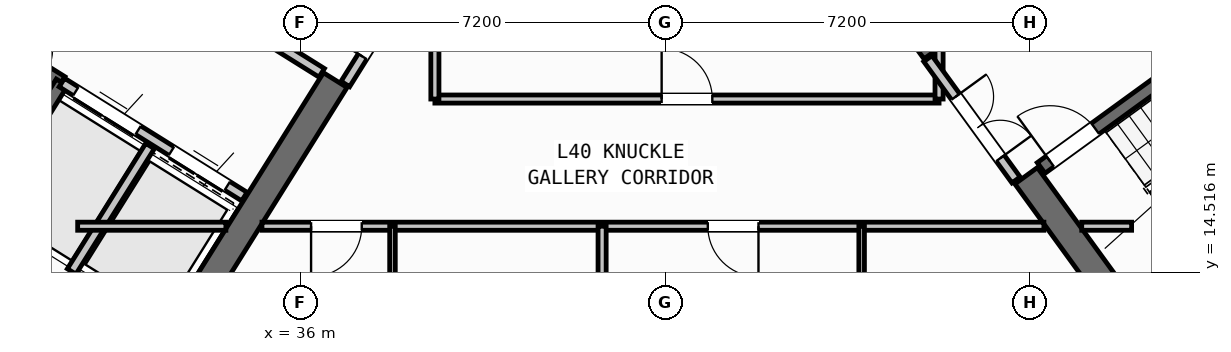
"""IFC4 building model, lengths in metres.
Left out: names, types, materials, properties, quantities, classifications, styles, units other than length and angle.
Written with IfcOpenShell. Run it as: python <this file> out.ifc"""

import sys

from ifc_helpers import new_model, si_unit, direction, frame, frame_2d, origin, place, context, subcontext, project, spatial, rectangle, extrude, source, transform, mapped, element, fill, save


model = new_model("IFC4")
c1 = context("Model", 3, precision=1e-05, world=origin(), true_north=direction((0.0, 1.0)))
c2 = subcontext(c1, "Body", "Model", "MODEL_VIEW")
j1 = project(units=[si_unit("LENGTHUNIT", "METRE"), si_unit("PLANEANGLEUNIT", "RADIAN")], contexts=[c1])
p1 = place(None, origin())
s1 = spatial("IfcSite", under=j1, at=p1, CompositionType="ELEMENT")
p2 = place(p1, origin())
s2 = spatial("IfcBuilding", under=s1, at=p2, CompositionType="ELEMENT")
p3 = place(p2, frame((0.0, 0.0, 158.7)))
s3 = spatial("IfcBuildingStorey", under=s2, at=p3, CompositionType="ELEMENT", Elevation=158.7)
p4 = place(p3, frame((33.366, 12.477, 0.0), z_axis=(0.0, 0.0, 1.0), x_axis=(-0.848047359947, 0.529920442413, 0.0)))
e1 = element("IfcWall", 1, at=p4, inside=s3, PredefinedType="SHEAR", context=c2, shape_type="SweptSolid", body=[
    extrude(rectangle(XDim=13.14, YDim=0.55, at=frame_2d((6.57, 0.0))), origin(), (0.0, 0.0, 1.0), 3.35),
])
p5 = place(p3, frame((36.683, 18.304, 0.0), z_axis=(0.0, 0.0, 1.0), x_axis=(-0.529896466841, -0.848062341122, 0.0)))
e2 = element("IfcWall", 2, at=p5, inside=s3, PredefinedType="SHEAR", context=c2, shape_type="SweptSolid", body=[
    extrude(rectangle(XDim=6.425, YDim=0.55, at=frame_2d((3.212, 0.0))), origin(), (0.0, 0.0, 1.0), 3.35),
])
p6 = place(p3, frame((52.359, 13.14, 0.0), z_axis=(0.0, 0.0, 1.0), x_axis=(0.809014896919, 0.587788139183, 0.0)))
e3 = element("IfcWall", 3, at=p6, inside=s3, PredefinedType="SHEAR", context=c2, shape_type="SweptSolid", body=[
    extrude(rectangle(XDim=12.34, YDim=0.55, at=frame_2d((6.17, 0.0))), origin(), (0.0, 0.0, 1.0), 3.35),
])
p7 = place(p3, frame((52.42, 13.524, 0.0), z_axis=(0.0, 0.0, 1.0), x_axis=(-0.587802113096, 0.809004744015, 0.0)))
e4 = element("IfcWall", 4, at=p7, inside=s3, PredefinedType="SHEAR", context=c2, shape_type="SweptSolid", body=[
    extrude(rectangle(XDim=3.575, YDim=0.55, at=frame_2d((1.788, 0.0))), origin(), (0.0, 0.0, 1.0), 3.35),
])
p8 = place(p3, frame((48.526, 18.884, 0.0), z_axis=(0.0, 0.0, 1.0), x_axis=(-0.587764933797, 0.809031756236, 0.0)))
e5 = element("IfcWall", 5, at=p8, inside=s3, PredefinedType="SHEAR", context=c2, shape_type="SweptSolid", body=[
    extrude(rectangle(XDim=6.425, YDim=0.55, at=frame_2d((3.212, 0.0))), origin(), (0.0, 0.0, 1.0), 3.35),
])
p9 = place(p3, frame((31.28, 18.261, 0.0), z_axis=(0.0, 0.0, 1.0), x_axis=(-0.848051618787, 0.529913626805, 0.0)))
e6 = element("IfcWall", 6, at=p9, inside=s3, PredefinedType="SHEAR", context=c2, shape_type="SweptSolid", body=[
    extrude(rectangle(XDim=7.46, YDim=0.26, at=frame_2d((3.73, 0.0))), origin(), (0.0, 0.0, 1.0), 3.35),
])
p10 = place(p9, frame((0.36, 0.0, 0.0)))
e7 = element("IfcOpeningElement", 7, at=p10, cuts=e6, PredefinedType="OPENING", context=c2, shape_type="SweptSolid", body=[
    extrude(rectangle(XDim=0.86, YDim=2.05, at=frame_2d((0.43, 1.025))), frame((0.0, 0.14, 0.0), z_axis=(0.0, -1.0, 0.0), x_axis=(1.0, 0.0, 0.0)), (0.0, 0.0, 1.0), 0.28),
])
p11 = place(p3, frame((31.288, 18.256, 0.0), z_axis=(0.0, 0.0, 1.0), x_axis=(-0.529943379326, -0.848033026897, 0.0)))
e8 = element("IfcWall", 8, at=p11, inside=s3, PredefinedType="SHEAR", context=c2, shape_type="SweptSolid", body=[
    extrude(rectangle(XDim=3.16, YDim=0.26, at=frame_2d((1.58, 0.0))), origin(), (0.0, 0.0, 1.0), 3.35),
])
p12 = place(p3, frame((34.891, 16.005, 0.0), z_axis=(0.0, 0.0, 1.0), x_axis=(-0.848062873452, 0.529895614884, 0.0)))
e9 = element("IfcWall", 9, at=p12, inside=s3, PredefinedType="STANDARD", context=c2, shape_type="SweptSolid", body=[
    extrude(rectangle(XDim=4.248, YDim=0.2, at=frame_2d((2.124, 0.0))), origin(), (0.0, 0.0, 1.0), 3.34),
])
p13 = place(p12, frame((0.398, 0.0, 0.0)))
e10 = element("IfcOpeningElement", 10, at=p13, cuts=e9, PredefinedType="OPENING", context=c2, shape_type="SweptSolid", body=[
    extrude(rectangle(XDim=1.3, YDim=2.2, at=frame_2d((0.65, 1.1))), frame((0.0, 0.11, 0.0), z_axis=(0.0, -1.0, 0.0), x_axis=(1.0, 0.0, 0.0)), (0.0, 0.0, 1.0), 0.22),
])
p14 = place(p12, frame((2.473, 0.0, 0.0)))
e11 = element("IfcOpeningElement", 11, at=p14, cuts=e9, PredefinedType="OPENING", context=c2, shape_type="SweptSolid", body=[
    extrude(rectangle(XDim=1.45, YDim=2.25, at=frame_2d((0.725, 1.125))), frame((0.0, 0.11, 0.0), z_axis=(0.0, -1.0, 0.0), x_axis=(1.0, 0.0, 0.0)), (0.0, 0.0, 1.0), 0.22),
])
p15 = place(p3, frame((36.417, 18.447, 0.0), z_axis=(0.0, 0.0, 1.0), x_axis=(-0.848064879198, 0.529892404805, 0.0)))
e12 = element("IfcWall", 12, at=p15, inside=s3, PredefinedType="STANDARD", context=c2, shape_type="SweptSolid", body=[
    extrude(rectangle(XDim=5.768, YDim=0.2, at=frame_2d((2.884, 0.0))), origin(), (0.0, 0.0, 1.0), 3.34),
])
p16 = place(p15, frame((2.548, 0.0, 0.0)))
e13 = element("IfcOpeningElement", 13, at=p16, cuts=e12, PredefinedType="OPENING", context=c2, shape_type="SweptSolid", body=[
    extrude(rectangle(XDim=1.15, YDim=2.1, at=frame_2d((0.575, 1.05))), frame((0.0, 0.11, 0.0), z_axis=(0.0, -1.0, 0.0), x_axis=(1.0, 0.0, 0.0)), (0.0, 0.0, 1.0), 0.22),
])
p17 = place(p3, frame((33.029, 17.003, 0.0), z_axis=(0.0, 0.0, 1.0), x_axis=(-0.529916267533, -0.848049968695, 0.0)))
e14 = element("IfcWall", 14, at=p17, inside=s3, PredefinedType="STANDARD", context=c2, shape_type="SweptSolid", body=[
    extrude(rectangle(XDim=2.92, YDim=0.2, at=frame_2d((1.46, 0.0))), origin(), (0.0, 0.0, 1.0), 3.34),
])
p18 = place(p3, frame((52.472, 14.013, 0.0), z_axis=(0.0, 0.0, 1.0), x_axis=(0.809028366311, 0.587769599847, 0.0)))
e15 = element("IfcWall", 15, at=p18, inside=s3, PredefinedType="SHEAR", context=c2, shape_type="SweptSolid", body=[
    extrude(rectangle(XDim=7.33, YDim=0.26, at=frame_2d((3.665, 0.0))), origin(), (0.0, 0.0, 1.0), 3.35),
])
p19 = place(p3, frame((50.615, 16.57, 0.0), z_axis=(0.0, 0.0, 1.0), x_axis=(0.809028366311, 0.587769599847, 0.0)))
e16 = element("IfcWall", 16, at=p19, inside=s3, PredefinedType="SHEAR", context=c2, shape_type="SweptSolid", body=[
    extrude(rectangle(XDim=7.33, YDim=0.26, at=frame_2d((3.665, 0.0))), origin(), (0.0, 0.0, 1.0), 3.35),
])
p20 = place(p19, frame((0.22, 0.0, 0.0)))
e17 = element("IfcOpeningElement", 17, at=p20, cuts=e16, PredefinedType="OPENING", context=c2, shape_type="SweptSolid", body=[
    extrude(rectangle(XDim=1.1, YDim=2.1, at=frame_2d((0.55, 1.05))), frame((0.0, 0.14, 0.0), z_axis=(0.0, -1.0, 0.0), x_axis=(1.0, 0.0, 0.0)), (0.0, 0.0, 1.0), 0.28),
])
p21 = place(p3, frame((32.164, 10.374, 0.0), z_axis=(0.0, 0.0, 1.0), x_axis=(-0.848044107957, 0.529925646633, 0.0)))
e18 = element("IfcWall", 18, at=p21, inside=s3, PredefinedType="PARTITIONING", context=c2, shape_type="SweptSolid", body=[
    extrude(rectangle(XDim=15.57, YDim=0.16, at=frame_2d((7.785, 0.0))), origin(), (0.0, 0.0, 1.0), 3.34),
])
p22 = place(p21, frame((10.83, 0.0, 0.0)))
e19 = element("IfcOpeningElement", 19, at=p22, cuts=e18, PredefinedType="OPENING", context=c2, shape_type="SweptSolid", body=[
    extrude(rectangle(XDim=1.0, YDim=2.1, at=frame_2d((0.5, 1.05))), frame((0.0, 0.09, 0.0), z_axis=(0.0, -1.0, 0.0), x_axis=(1.0, 0.0, 0.0)), (0.0, 0.0, 1.0), 0.18),
])
p23 = place(p3, frame((38.451, 20.737, 0.0), z_axis=(0.0, 0.0, 1.0), x_axis=(-0.529924799939, -0.848044637038, 0.0)))
e20 = element("IfcWall", 20, at=p23, inside=s3, PredefinedType="STANDARD", context=c2, shape_type="SweptSolid", body=[
    extrude(rectangle(XDim=2.96, YDim=0.2, at=frame_2d((1.48, 0.0))), origin(), (0.0, 0.0, 1.0), 3.34),
])
p24 = place(p23, frame((1.46, 0.0, 0.0)))
e21 = element("IfcOpeningElement", 21, at=p24, cuts=e20, PredefinedType="OPENING", context=c2, shape_type="SweptSolid", body=[
    extrude(rectangle(XDim=0.86, YDim=2.05, at=frame_2d((0.43, 1.025))), frame((0.0, 0.11, 0.0), z_axis=(0.0, -1.0, 0.0), x_axis=(1.0, 0.0, 0.0)), (0.0, 0.0, 1.0), 0.22),
])
p25 = place(p3, frame((31.6, 15.42, 0.0), z_axis=(0.0, 0.0, 1.0), x_axis=(1.0, 0.0, 0.0)))
e22 = element("IfcWall", 22, at=p25, inside=s3, PredefinedType="PARTITIONING", context=c2, shape_type="SweptSolid", body=[
    extrude(rectangle(XDim=2.925, YDim=0.16, at=frame_2d((1.462, 0.0))), origin(), (0.0, 0.0, 1.0), 3.34),
])
p26 = place(p3, frame((35.237, 15.42, 0.0), z_axis=(0.0, 0.0, 1.0), x_axis=(1.0, 0.0, 0.0)))
e23 = element("IfcWall", 23, at=p26, inside=s3, PredefinedType="PARTITIONING", context=c2, shape_type="SweptSolid", body=[
    extrude(rectangle(XDim=15.432, YDim=0.16, at=frame_2d((7.716, 0.0))), origin(), (0.0, 0.0, 1.0), 3.34),
])
p27 = place(p26, frame((0.969, 0.0, 0.0)))
e24 = element("IfcOpeningElement", 24, at=p27, cuts=e23, PredefinedType="OPENING", context=c2, shape_type="SweptSolid", body=[
    extrude(rectangle(XDim=1.0, YDim=2.1, at=frame_2d((0.5, 1.05))), frame((0.0, 0.09, 0.0), z_axis=(0.0, -1.0, 0.0), x_axis=(1.0, 0.0, 0.0)), (0.0, 0.0, 1.0), 0.18),
])
p28 = place(p26, frame((8.799, 0.0, 0.0)))
e25 = element("IfcOpeningElement", 25, at=p28, cuts=e23, PredefinedType="OPENING", context=c2, shape_type="SweptSolid", body=[
    extrude(rectangle(XDim=1.0, YDim=2.1, at=frame_2d((0.5, 1.05))), frame((0.0, 0.09, 0.0), z_axis=(0.0, -1.0, 0.0), x_axis=(1.0, 0.0, 0.0)), (0.0, 0.0, 1.0), 0.18),
])
p29 = place(p3, frame((51.416, 15.42, 0.0), z_axis=(0.0, 0.0, 1.0), x_axis=(1.0, 0.0, 0.0)))
e26 = element("IfcWall", 26, at=p29, inside=s3, PredefinedType="PARTITIONING", context=c2, shape_type="SweptSolid", body=[
    extrude(rectangle(XDim=0.984, YDim=0.16, at=frame_2d((0.492, 0.0))), origin(), (0.0, 0.0, 1.0), 3.34),
])
p30 = place(p3, frame((38.65, 17.93, 0.0), z_axis=(0.0, 0.0, 1.0), x_axis=(1.0, 0.0, 0.0)))
e27 = element("IfcWall", 27, at=p30, inside=s3, PredefinedType="PARTITIONING", context=c2, shape_type="SweptSolid", body=[
    extrude(rectangle(XDim=9.95, YDim=0.16, at=frame_2d((4.975, 0.0))), origin(), (0.0, 0.0, 1.0), 3.34),
])
p31 = place(p30, frame((4.475, 0.0, 0.0)))
e28 = element("IfcOpeningElement", 28, at=p31, cuts=e27, PredefinedType="OPENING", context=c2, shape_type="SweptSolid", body=[
    extrude(rectangle(XDim=1.0, YDim=2.1, at=frame_2d((0.5, 1.05))), frame((0.0, 0.09, 0.0), z_axis=(0.0, -1.0, 0.0), x_axis=(1.0, 0.0, 0.0)), (0.0, 0.0, 1.0), 0.18),
])
p32 = place(p3, frame((38.65, 17.93, 0.0), z_axis=(0.0, 0.0, 1.0), x_axis=(0.0, 1.0, 0.0)))
e29 = element("IfcWall", 29, at=p32, inside=s3, PredefinedType="PARTITIONING", context=c2, shape_type="SweptSolid", body=[
    extrude(rectangle(XDim=2.951, YDim=0.16, at=frame_2d((1.476, 0.0))), origin(), (0.0, 0.0, 1.0), 3.34),
])
p33 = place(p3, frame((48.6, 17.93, 0.0), z_axis=(0.0, 0.0, 1.0), x_axis=(0.0, 1.0, 0.0)))
e30 = element("IfcWall", 30, at=p33, inside=s3, PredefinedType="PARTITIONING", context=c2, shape_type="SweptSolid", body=[
    extrude(rectangle(XDim=0.993, YDim=0.16, at=frame_2d((0.496, 0.0))), origin(), (0.0, 0.0, 1.0), 3.34),
])
p34 = place(p3, frame((50.119, 16.333, 0.0), z_axis=(0.0, 0.0, 1.0), x_axis=(-0.587749856981, 0.809042709391, 0.0)))
e31 = element("IfcWall", 31, at=p34, inside=s3, PredefinedType="STANDARD", context=c2, shape_type="SweptSolid", body=[
    extrude(rectangle(XDim=2.96, YDim=0.2, at=frame_2d((1.48, 0.0))), origin(), (0.0, 0.0, 1.0), 3.34),
])
p35 = place(p34, frame((0.53, 0.0, 0.0)))
e32 = element("IfcOpeningElement", 32, at=p35, cuts=e31, PredefinedType="OPENING", context=c2, shape_type="SweptSolid", body=[
    extrude(rectangle(XDim=1.5, YDim=2.15, at=frame_2d((0.75, 1.075))), frame((0.0, 0.11, 0.0), z_axis=(0.0, -1.0, 0.0), x_axis=(1.0, 0.0, 0.0)), (0.0, 0.0, 1.0), 0.22),
])
p36 = place(p3, frame((41.95, 1.96, 0.0), z_axis=(0.0, 0.0, 1.0), x_axis=(0.0, 1.0, 0.0)))
e33 = element("IfcWall", 33, at=p36, inside=s3, PredefinedType="PARTITIONING", context=c2, shape_type="SweptSolid", body=[
    extrude(rectangle(XDim=13.46, YDim=0.16, at=frame_2d((6.73, 0.0))), origin(), (0.0, 0.0, 1.0), 3.34),
])
p37 = place(p3, frame((37.813, 1.96, 0.0), z_axis=(0.0, 0.0, 1.0), x_axis=(0.0, 1.0, 0.0)))
e34 = element("IfcWall", 34, at=p37, inside=s3, PredefinedType="PARTITIONING", context=c2, shape_type="SweptSolid", body=[
    extrude(rectangle(XDim=13.46, YDim=0.11, at=frame_2d((6.73, 0.0))), origin(), (0.0, 0.0, 1.0), 3.34),
])
p38 = place(p37, frame((5.5, 0.0, 0.0)))
e35 = element("IfcOpeningElement", 35, at=p38, cuts=e34, PredefinedType="OPENING", context=c2, shape_type="SweptSolid", body=[
    extrude(rectangle(XDim=0.92, YDim=2.08, at=frame_2d((0.46, 1.04))), frame((0.0, 0.065, 0.0), z_axis=(0.0, -1.0, 0.0), x_axis=(1.0, 0.0, 0.0)), (0.0, 0.0, 1.0), 0.13),
])
p39 = place(p37, frame((10.89, 0.0, 0.0)))
e36 = element("IfcOpeningElement", 36, at=p39, cuts=e34, PredefinedType="OPENING", context=c2, shape_type="SweptSolid", body=[
    extrude(rectangle(XDim=0.88, YDim=2.08, at=frame_2d((0.44, 1.04))), frame((0.0, 0.065, 0.0), z_axis=(0.0, -1.0, 0.0), x_axis=(1.0, 0.0, 0.0)), (0.0, 0.0, 1.0), 0.13),
])
p40 = place(p3, frame((47.072, 1.96, 0.0), z_axis=(0.0, 0.0, 1.0), x_axis=(0.0, 1.0, 0.0)))
e37 = element("IfcWall", 37, at=p40, inside=s3, PredefinedType="PARTITIONING", context=c2, shape_type="SweptSolid", body=[
    extrude(rectangle(XDim=13.46, YDim=0.11, at=frame_2d((6.73, 0.0))), origin(), (0.0, 0.0, 1.0), 3.34),
])
p41 = place(p40, frame((6.6, 0.0, 0.0)))
e38 = element("IfcOpeningElement", 38, at=p41, cuts=e37, PredefinedType="OPENING", context=c2, shape_type="SweptSolid", body=[
    extrude(rectangle(XDim=0.92, YDim=2.08, at=frame_2d((0.46, 1.04))), frame((0.0, 0.065, 0.0), z_axis=(0.0, -1.0, 0.0), x_axis=(1.0, 0.0, 0.0)), (0.0, 0.0, 1.0), 0.13),
])
p42 = place(p40, frame((11.54, 0.0, 0.0)))
e39 = element("IfcOpeningElement", 39, at=p42, cuts=e37, PredefinedType="OPENING", context=c2, shape_type="SweptSolid", body=[
    extrude(rectangle(XDim=0.88, YDim=2.08, at=frame_2d((0.44, 1.04))), frame((0.0, 0.065, 0.0), z_axis=(0.0, -1.0, 0.0), x_axis=(1.0, 0.0, 0.0)), (0.0, 0.0, 1.0), 0.13),
])
m1 = source(origin(), c2, "Body", "SweptSolid", [
    extrude(rectangle(XDim=1.3, YDim=2.2, at=frame_2d((0.65, 1.1))), frame((0.0, 0.025, 0.0), z_axis=(0.0, -1.0, 0.0), x_axis=(1.0, 0.0, 0.0)), (0.0, 0.0, 1.0), 0.05),
])
p43 = place(p13, origin())
e40 = element("IfcDoor", 40, at=p43, inside=s3, OperationType="DOUBLE_DOOR_SLIDING", PredefinedType="DOOR", context=c2, shape_type="MappedRepresentation", body=[
    mapped(m1, transform((0.0, 0.0, 0.0), scale=1.0)),
])
fill(e10, e40)
m2 = source(origin(), c2, "Body", "SweptSolid", [
    extrude(rectangle(XDim=1.45, YDim=2.25, at=frame_2d((0.725, 1.125))), frame((0.0, 0.025, 0.0), z_axis=(0.0, -1.0, 0.0), x_axis=(1.0, 0.0, 0.0)), (0.0, 0.0, 1.0), 0.05),
])
p44 = place(p14, origin())
e41 = element("IfcDoor", 41, at=p44, inside=s3, OperationType="DOUBLE_DOOR_SLIDING", PredefinedType="DOOR", context=c2, shape_type="MappedRepresentation", body=[
    mapped(m2, transform((0.0, 0.0, 0.0), scale=1.0)),
])
fill(e11, e41)
m3 = source(origin(), c2, "Body", "SweptSolid", [
    extrude(rectangle(XDim=1.1, YDim=2.1, at=frame_2d((0.55, 1.05))), frame((0.0, 0.025, 0.0), z_axis=(0.0, -1.0, 0.0), x_axis=(1.0, 0.0, 0.0)), (0.0, 0.0, 1.0), 0.05),
])
p45 = place(p20, origin())
e42 = element("IfcDoor", 42, at=p45, inside=s3, OperationType="SINGLE_SWING_LEFT", PredefinedType="DOOR", context=c2, shape_type="MappedRepresentation", body=[
    mapped(m3, transform((0.0, 0.0, 0.0), scale=1.0)),
])
fill(e17, e42)
m4 = source(origin(), c2, "Body", "SweptSolid", [
    extrude(rectangle(XDim=1.0, YDim=2.1, at=frame_2d((0.5, 1.05))), frame((0.0, 0.025, 0.0), z_axis=(0.0, -1.0, 0.0), x_axis=(1.0, 0.0, 0.0)), (0.0, 0.0, 1.0), 0.05),
])
p46 = place(p31, origin())
e43 = element("IfcDoor", 43, at=p46, inside=s3, OperationType="SINGLE_SWING_LEFT", PredefinedType="DOOR", context=c2, shape_type="MappedRepresentation", body=[
    mapped(m4, transform((0.0, 0.0, 0.0), scale=1.0)),
])
fill(e28, e43)
m5 = source(origin(), c2, "Body", "SweptSolid", [
    extrude(rectangle(XDim=0.86, YDim=2.05, at=frame_2d((0.43, 1.025))), frame((0.0, 0.025, 0.0), z_axis=(0.0, -1.0, 0.0), x_axis=(1.0, 0.0, 0.0)), (0.0, 0.0, 1.0), 0.05),
])
p47 = place(p24, frame((0.86, 0.0, 0.0), z_axis=(0.0, 0.0, 1.0), x_axis=(-1.0, 0.0, 0.0)))
e44 = element("IfcDoor", 44, at=p47, inside=s3, OperationType="SINGLE_SWING_LEFT", PredefinedType="DOOR", context=c2, shape_type="MappedRepresentation", body=[
    mapped(m5, transform((0.0, 0.0, 0.0), scale=1.0)),
])
fill(e21, e44)
m6 = source(origin(), c2, "Body", "SweptSolid", [
    extrude(rectangle(XDim=1.5, YDim=2.15, at=frame_2d((0.75, 1.075))), frame((0.0, 0.025, 0.0), z_axis=(0.0, -1.0, 0.0), x_axis=(1.0, 0.0, 0.0)), (0.0, 0.0, 1.0), 0.05),
])
p48 = place(p35, frame((1.5, 0.0, 0.0), z_axis=(0.0, 0.0, 1.0), x_axis=(-1.0, 0.0, 0.0)))
e45 = element("IfcDoor", 45, at=p48, inside=s3, OperationType="DOUBLE_DOOR_SINGLE_SWING", PredefinedType="DOOR", context=c2, shape_type="MappedRepresentation", body=[
    mapped(m6, transform((0.0, 0.0, 0.0), scale=1.0)),
])
fill(e32, e45)
p49 = place(p27, frame((1.0, 0.0, 0.0), z_axis=(0.0, 0.0, 1.0), x_axis=(-1.0, 0.0, 0.0)))
e46 = element("IfcDoor", 46, at=p49, inside=s3, OperationType="SINGLE_SWING_RIGHT", PredefinedType="DOOR", context=c2, shape_type="MappedRepresentation", body=[
    mapped(m4, transform((0.0, 0.0, 0.0), scale=1.0)),
])
fill(e24, e46)
p50 = place(p28, frame((1.0, 0.0, 0.0), z_axis=(0.0, 0.0, 1.0), x_axis=(-1.0, 0.0, 0.0)))
e47 = element("IfcDoor", 47, at=p50, inside=s3, OperationType="SINGLE_SWING_LEFT", PredefinedType="DOOR", context=c2, shape_type="MappedRepresentation", body=[
    mapped(m4, transform((0.0, 0.0, 0.0), scale=1.0)),
])
fill(e25, e47)
save(model, sys.argv[1])
